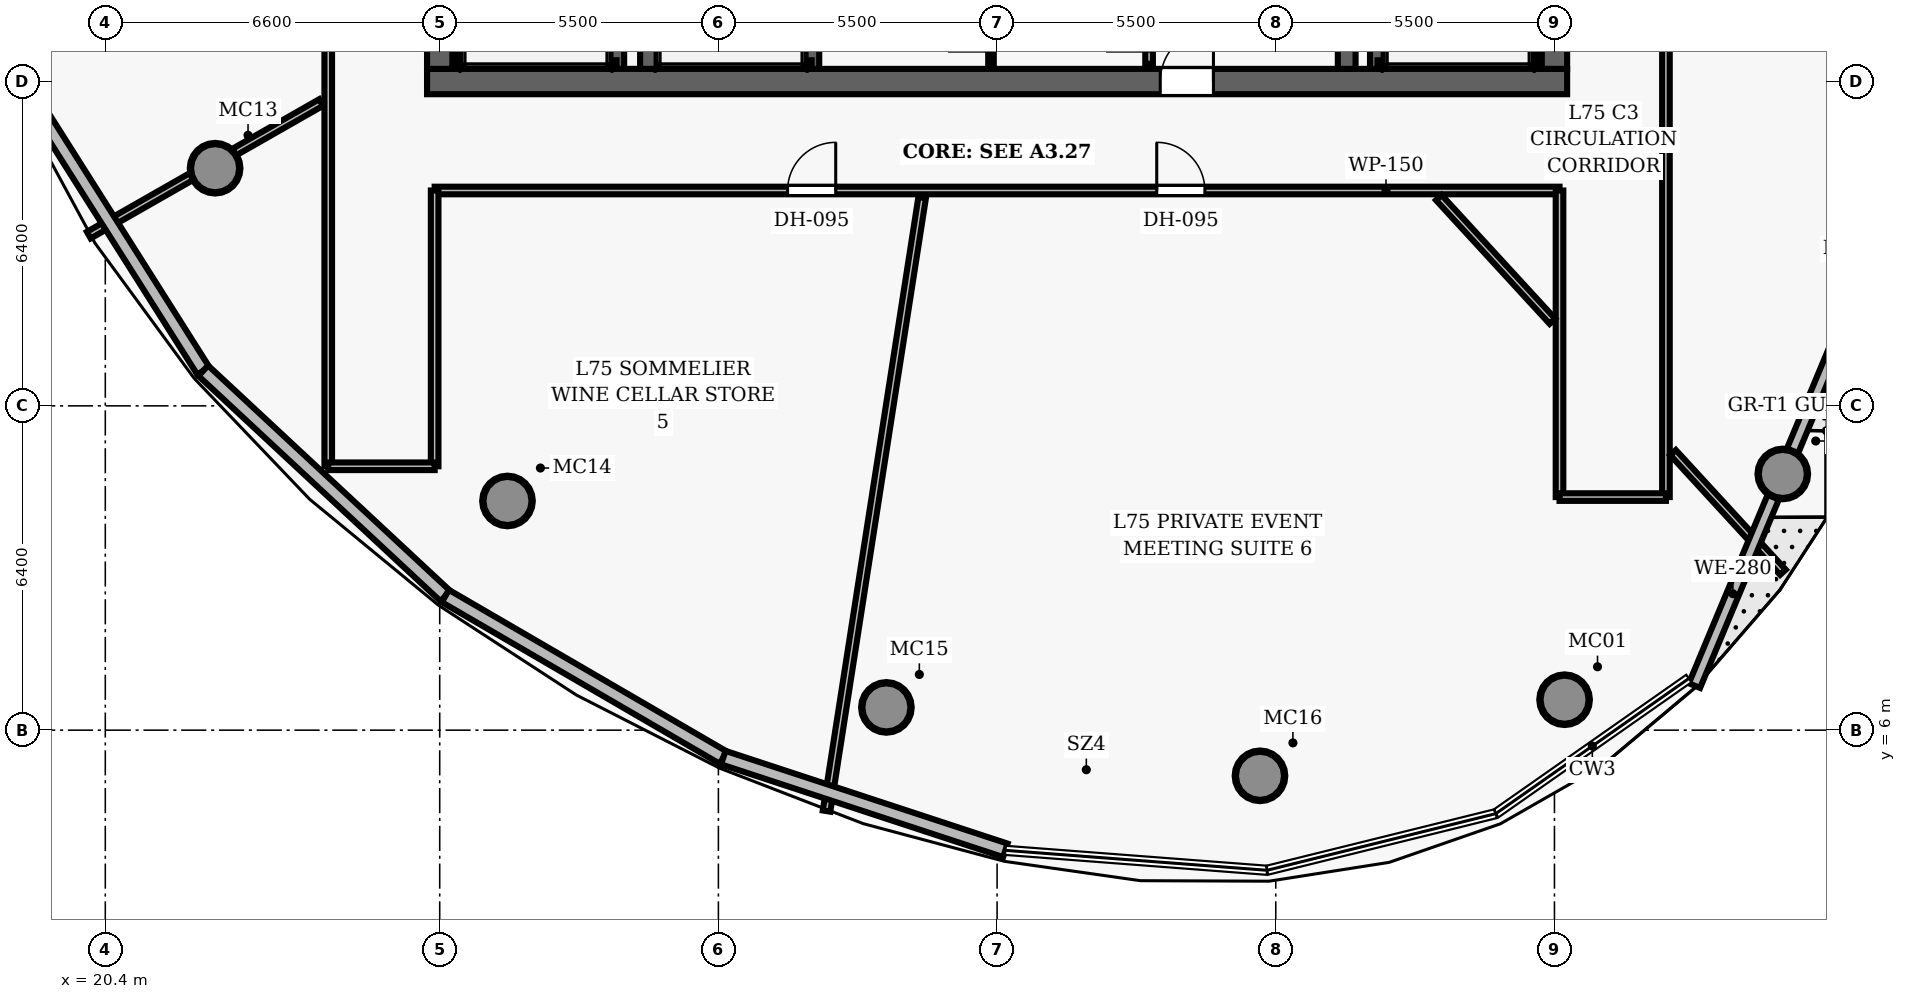
"""IFC4 building model, lengths in metres.
Left out: names, types, materials, properties, quantities, classifications, styles, units other than length and angle.
Written with IfcOpenShell. Run it as: python <this file> out.ifc"""

import sys

from ifc_helpers import new_model, si_unit, direction, frame, frame_2d, origin, origin_2d, place, context, subcontext, project, spatial, rectangle, hollow_circle, extrude, element, fill, save


model = new_model("IFC4")
c1 = context("Model", 3, precision=1e-05, world=origin(), true_north=direction((0.0, 1.0)))
c2 = subcontext(c1, "Body", "Model", "MODEL_VIEW")
j1 = project(units=[si_unit("LENGTHUNIT", "METRE"), si_unit("PLANEANGLEUNIT", "RADIAN")], contexts=[c1])
p1 = place(None, origin())
s1 = spatial("IfcSite", under=j1, at=p1, CompositionType="ELEMENT")
p2 = place(p1, origin())
s2 = spatial("IfcBuilding", under=s1, at=p2, CompositionType="ELEMENT")
p3 = place(p2, frame((0.0, 0.0, 295.95)))
s3 = spatial("IfcBuildingStorey", under=s2, at=p3, CompositionType="ELEMENT", Elevation=295.95)
p4 = place(p3, frame((26.75, 18.8, 0.0), z_axis=(0.0, 0.0, 1.0), x_axis=(1.0, 0.0, 0.0)))
e1 = element("IfcWall", 1, at=p4, inside=s3, PredefinedType="SHEAR", context=c2, shape_type="SweptSolid", body=[
    extrude(rectangle(XDim=22.5, YDim=0.5, at=frame_2d((11.25, 0.0))), origin(), (0.0, 0.0, 1.0), 3.85),
])
p5 = place(p4, frame((14.47, 0.0, 0.0)))
e2 = element("IfcOpeningElement", 2, at=p5, cuts=e1, PredefinedType="OPENING", context=c2, shape_type="SweptSolid", body=[
    extrude(rectangle(XDim=1.05, YDim=2.15, at=frame_2d((0.525, 1.075))), frame((0.0, 0.26, 0.0), z_axis=(0.0, -1.0, 0.0), x_axis=(1.0, 0.0, 0.0)), (0.0, 0.0, 1.0), 0.52),
])
p6 = place(p3, frame((27.0, 19.05, 0.0), z_axis=(0.0, 0.0, 1.0), x_axis=(0.0, 1.0, 0.0)))
e3 = element("IfcWall", 3, at=p6, inside=s3, PredefinedType="SHEAR", context=c2, shape_type="SweptSolid", body=[
    extrude(rectangle(XDim=13.9, YDim=0.5, at=frame_2d((6.95, 0.0))), origin(), (0.0, 0.0, 1.0), 3.85),
])
p7 = place(p6, frame((8.2, 0.0, 0.0)))
e4 = element("IfcOpeningElement", 4, at=p7, cuts=e3, PredefinedType="OPENING", context=c2, shape_type="SweptSolid", body=[
    extrude(rectangle(XDim=1.05, YDim=2.15, at=frame_2d((0.525, 1.075))), frame((0.0, 0.26, 0.0), z_axis=(0.0, -1.0, 0.0), x_axis=(1.0, 0.0, 0.0)), (0.0, 0.0, 1.0), 0.52),
])
p8 = place(p3, frame((49.0, 19.05, 0.0), z_axis=(0.0, 0.0, 1.0), x_axis=(0.0, 1.0, 0.0)))
e5 = element("IfcWall", 5, at=p8, inside=s3, PredefinedType="SHEAR", context=c2, shape_type="SweptSolid", body=[
    extrude(rectangle(XDim=13.9, YDim=0.5, at=frame_2d((6.95, 0.0))), origin(), (0.0, 0.0, 1.0), 3.85),
])
p9 = place(p8, frame((8.2, 0.0, 0.0)))
e6 = element("IfcOpeningElement", 6, at=p9, cuts=e5, PredefinedType="OPENING", context=c2, shape_type="SweptSolid", body=[
    extrude(rectangle(XDim=1.05, YDim=2.15, at=frame_2d((0.525, 1.075))), frame((0.0, 0.26, 0.0), z_axis=(0.0, -1.0, 0.0), x_axis=(1.0, 0.0, 0.0)), (0.0, 0.0, 1.0), 0.52),
])
for number, where, z_axis, x_axis in (
    (7, (31.13, 19.05, 0.0), (0.0, 0.0, 1.0), (0.0, 1.0, 0.0)),
    (8, (44.9, 19.05, 0.0), (0.0, 0.0, 1.0), (0.0, 1.0, 0.0)),
):
    element("IfcWall", number, at=place(p3, frame(where, z_axis=z_axis, x_axis=x_axis)), inside=s3, PredefinedType="SHEAR", context=c2, shape_type="SweptSolid", body=[
        extrude(rectangle(XDim=13.9, YDim=0.35, at=frame_2d((6.95, 0.0))), origin(), (0.0, 0.0, 1.0), 3.85),
    ])
for number, where, z_axis, x_axis in (
    (9, (49.2, 6.601, 0.0), (0.0, 0.0, 1.0), (1.0, 0.0, 0.0)),
    (10, (53.506, 11.056, 0.0), (0.0, 0.0, 1.0), (1.0, 0.0, 0.0)),
    (11, (22.567, 17.09, 0.0), (0.0, 0.0, 1.0), (1.0, 0.0, 0.0)),
    (12, (28.338, 10.523, 0.0), (0.0, 0.0, 1.0), (1.0, 0.0, 0.0)),
    (13, (35.815, 6.449, 0.0), (0.0, 0.0, 1.0), (1.0, 0.0, 0.0)),
    (14, (43.188, 5.099, 0.0), (0.0, 0.0, 1.0), (1.0, 0.0, 0.0)),
):
    element("IfcColumn", number, at=place(p3, frame(where, z_axis=z_axis, x_axis=x_axis)), inside=s3, PredefinedType="COLUMN", context=c2, shape_type="SweptSolid", body=[
        extrude(hollow_circle(Radius=0.5, WallThickness=0.045, at=origin_2d()), origin(), (0.0, 0.0, 1.0), 3.85),
    ])
p10 = place(p3, frame((30.49, 19.05, 0.0), z_axis=(0.0, 0.0, 1.0), x_axis=(0.0, 1.0, 0.0)))
e15 = element("IfcWall", 15, at=p10, inside=s3, PredefinedType="SHEAR", context=c2, shape_type="SweptSolid", body=[
    extrude(rectangle(XDim=7.5, YDim=0.3, at=frame_2d((3.75, 0.0))), origin(), (0.0, 0.0, 1.0), 3.85),
])
p11 = place(p3, frame((27.395, 19.1, 0.0), z_axis=(0.0, 0.0, 1.0), x_axis=(0.0, 1.0, 0.0)))
e16 = element("IfcWall", 16, at=p11, inside=s3, PredefinedType="SHEAR", context=c2, shape_type="SweptSolid", body=[
    extrude(rectangle(XDim=7.45, YDim=0.12, at=frame_2d((3.725, 0.0))), origin(), (0.0, 0.0, 1.0), 3.85),
])
p12 = place(p3, frame((27.395, 19.16, 0.0), z_axis=(0.0, 0.0, 1.0), x_axis=(1.0, 0.0, 0.0)))
e17 = element("IfcWall", 17, at=p12, inside=s3, PredefinedType="SHEAR", context=c2, shape_type="SweptSolid", body=[
    extrude(rectangle(XDim=3.095, YDim=0.12, at=frame_2d((1.547, 0.0))), origin(), (0.0, 0.0, 1.0), 3.85),
])
p13 = place(p3, frame((45.51, 19.05, 0.0), z_axis=(0.0, 0.0, 1.0), x_axis=(0.0, 1.0, 0.0)))
e18 = element("IfcWall", 18, at=p13, inside=s3, PredefinedType="SHEAR", context=c2, shape_type="SweptSolid", body=[
    extrude(rectangle(XDim=7.5, YDim=0.3, at=frame_2d((3.75, 0.0))), origin(), (0.0, 0.0, 1.0), 3.85),
])
p14 = place(p3, frame((48.605, 19.1, 0.0), z_axis=(0.0, 0.0, 1.0), x_axis=(0.0, 1.0, 0.0)))
e19 = element("IfcWall", 19, at=p14, inside=s3, PredefinedType="SHEAR", context=c2, shape_type="SweptSolid", body=[
    extrude(rectangle(XDim=7.45, YDim=0.12, at=frame_2d((3.725, 0.0))), origin(), (0.0, 0.0, 1.0), 3.85),
])
p15 = place(p3, frame((45.51, 19.16, 0.0), z_axis=(0.0, 0.0, 1.0), x_axis=(1.0, 0.0, 0.0)))
e20 = element("IfcWall", 20, at=p15, inside=s3, PredefinedType="SHEAR", context=c2, shape_type="SweptSolid", body=[
    extrude(rectangle(XDim=3.095, YDim=0.12, at=frame_2d((1.547, 0.0))), origin(), (0.0, 0.0, 1.0), 3.85),
])
p16 = place(p3, frame((34.34, 19.05, 0.0), z_axis=(0.0, 0.0, 1.0), x_axis=(0.0, 1.0, 0.0)))
e21 = element("IfcWall", 21, at=p16, inside=s3, PredefinedType="SHEAR", context=c2, shape_type="SweptSolid", body=[
    extrude(rectangle(XDim=7.5, YDim=0.3, at=frame_2d((3.75, 0.0))), origin(), (0.0, 0.0, 1.0), 3.85),
])
p17 = place(p3, frame((31.3, 19.16, 0.0), z_axis=(0.0, 0.0, 1.0), x_axis=(1.0, 0.0, 0.0)))
e22 = element("IfcWall", 22, at=p17, inside=s3, PredefinedType="SHEAR", context=c2, shape_type="SweptSolid", body=[
    extrude(rectangle(XDim=3.04, YDim=0.12, at=frame_2d((1.52, 0.0))), origin(), (0.0, 0.0, 1.0), 3.85),
])
p18 = place(p3, frame((41.0, 19.15, 0.0), z_axis=(0.0, 0.0, 1.0), x_axis=(0.0, 1.0, 0.0)))
e23 = element("IfcWall", 23, at=p18, inside=s3, PredefinedType="PARTITIONING", context=c2, shape_type="SweptSolid", body=[
    extrude(rectangle(XDim=7.95, YDim=0.15, at=frame_2d((3.975, 0.0))), origin(), (0.0, 0.0, 1.0), 3.04),
])
p19 = place(p18, frame((0.25, 0.0, 0.0)))
e24 = element("IfcOpeningElement", 24, at=p19, cuts=e23, PredefinedType="OPENING", context=c2, shape_type="SweptSolid", body=[
    extrude(rectangle(XDim=0.85, YDim=2.1, at=frame_2d((0.425, 1.05))), frame((0.0, 0.085, 0.0), z_axis=(0.0, -1.0, 0.0), x_axis=(1.0, 0.0, 0.0)), (0.0, 0.0, 1.0), 0.17),
])
p20 = place(p18, frame((2.953, 0.0, 0.0)))
e25 = element("IfcOpeningElement", 25, at=p20, cuts=e23, PredefinedType="OPENING", context=c2, shape_type="SweptSolid", body=[
    extrude(rectangle(XDim=0.85, YDim=2.1, at=frame_2d((0.425, 1.05))), frame((0.0, 0.085, 0.0), z_axis=(0.0, -1.0, 0.0), x_axis=(1.0, 0.0, 0.0)), (0.0, 0.0, 1.0), 0.17),
])
p21 = place(p18, frame((5.576, 0.0, 0.0)))
e26 = element("IfcOpeningElement", 26, at=p21, cuts=e23, PredefinedType="OPENING", context=c2, shape_type="SweptSolid", body=[
    extrude(rectangle(XDim=0.85, YDim=2.1, at=frame_2d((0.425, 1.05))), frame((0.0, 0.085, 0.0), z_axis=(0.0, -1.0, 0.0), x_axis=(1.0, 0.0, 0.0)), (0.0, 0.0, 1.0), 0.17),
])
p22 = place(p3, frame((37.88, 19.15, 0.0), z_axis=(0.0, 0.0, 1.0), x_axis=(0.0, 1.0, 0.0)))
e27 = element("IfcWall", 27, at=p22, inside=s3, PredefinedType="PARTITIONING", context=c2, shape_type="SweptSolid", body=[
    extrude(rectangle(XDim=7.95, YDim=0.11, at=frame_2d((3.975, 0.0))), origin(), (0.0, 0.0, 1.0), 3.04),
])
p23 = place(p22, frame((0.25, 0.0, 0.0)))
e28 = element("IfcOpeningElement", 28, at=p23, cuts=e27, PredefinedType="OPENING", context=c2, shape_type="SweptSolid", body=[
    extrude(rectangle(XDim=0.85, YDim=2.1, at=frame_2d((0.425, 1.05))), frame((0.0, 0.065, 0.0), z_axis=(0.0, -1.0, 0.0), x_axis=(1.0, 0.0, 0.0)), (0.0, 0.0, 1.0), 0.13),
])
p24 = place(p22, frame((2.953, 0.0, 0.0)))
e29 = element("IfcOpeningElement", 29, at=p24, cuts=e27, PredefinedType="OPENING", context=c2, shape_type="SweptSolid", body=[
    extrude(rectangle(XDim=0.85, YDim=2.1, at=frame_2d((0.425, 1.05))), frame((0.0, 0.065, 0.0), z_axis=(0.0, -1.0, 0.0), x_axis=(1.0, 0.0, 0.0)), (0.0, 0.0, 1.0), 0.13),
])
p25 = place(p22, frame((5.576, 0.0, 0.0)))
e30 = element("IfcOpeningElement", 30, at=p25, cuts=e27, PredefinedType="OPENING", context=c2, shape_type="SweptSolid", body=[
    extrude(rectangle(XDim=0.85, YDim=2.1, at=frame_2d((0.425, 1.05))), frame((0.0, 0.065, 0.0), z_axis=(0.0, -1.0, 0.0), x_axis=(1.0, 0.0, 0.0)), (0.0, 0.0, 1.0), 0.13),
])
p26 = place(p3, frame((26.9, 16.65, 0.0), z_axis=(0.0, 0.0, 1.0), x_axis=(1.0, 0.0, 0.0)))
e31 = element("IfcWall", 31, at=p26, inside=s3, PredefinedType="PARTITIONING", context=c2, shape_type="SweptSolid", body=[
    extrude(rectangle(XDim=22.2, YDim=0.15, at=frame_2d((11.1, 0.0))), origin(), (0.0, 0.0, 1.0), 3.04),
])
p27 = place(p26, frame((6.965, 0.0, 0.0)))
e32 = element("IfcOpeningElement", 32, at=p27, cuts=e31, PredefinedType="OPENING", context=c2, shape_type="SweptSolid", body=[
    extrude(rectangle(XDim=0.95, YDim=2.15, at=frame_2d((0.475, 1.075))), frame((0.0, 0.085, 0.0), z_axis=(0.0, -1.0, 0.0), x_axis=(1.0, 0.0, 0.0)), (0.0, 0.0, 1.0), 0.17),
])
p28 = place(p26, frame((14.251, 0.0, 0.0)))
e33 = element("IfcOpeningElement", 33, at=p28, cuts=e31, PredefinedType="OPENING", context=c2, shape_type="SweptSolid", body=[
    extrude(rectangle(XDim=0.95, YDim=2.15, at=frame_2d((0.475, 1.075))), frame((0.0, 0.085, 0.0), z_axis=(0.0, -1.0, 0.0), x_axis=(1.0, 0.0, 0.0)), (0.0, 0.0, 1.0), 0.17),
])
p29 = place(p3, frame((24.8, 11.208, 0.0), z_axis=(0.0, 0.0, 1.0), x_axis=(0.0, 1.0, 0.0)))
e34 = element("IfcWall", 34, at=p29, inside=s3, PredefinedType="PARTITIONING", context=c2, shape_type="SweptSolid", body=[
    extrude(rectangle(XDim=30.192, YDim=0.15, at=frame_2d((15.096, 0.0))), origin(), (0.0, 0.0, 1.0), 3.04),
])
p30 = place(p29, frame((16.542, 0.0, 0.0)))
e35 = element("IfcOpeningElement", 35, at=p30, cuts=e34, PredefinedType="OPENING", context=c2, shape_type="SweptSolid", body=[
    extrude(rectangle(XDim=0.95, YDim=2.15, at=frame_2d((0.475, 1.075))), frame((0.0, 0.085, 0.0), z_axis=(0.0, -1.0, 0.0), x_axis=(1.0, 0.0, 0.0)), (0.0, 0.0, 1.0), 0.17),
])
p31 = place(p3, frame((26.9, 11.208, 0.0), z_axis=(0.0, 0.0, 1.0), x_axis=(0.0, 1.0, 0.0)))
e36 = element("IfcWall", 36, at=p31, inside=s3, PredefinedType="PARTITIONING", context=c2, shape_type="SweptSolid", body=[
    extrude(rectangle(XDim=5.442, YDim=0.15, at=frame_2d((2.721, 0.0))), origin(), (0.0, 0.0, 1.0), 3.04),
])
p32 = place(p3, frame((24.8, 11.208, 0.0), z_axis=(0.0, 0.0, 1.0), x_axis=(1.0, 0.0, 0.0)))
e37 = element("IfcWall", 37, at=p32, inside=s3, PredefinedType="PARTITIONING", context=c2, shape_type="SweptSolid", body=[
    extrude(rectangle(XDim=2.1, YDim=0.15, at=frame_2d((1.05, 0.0))), origin(), (0.0, 0.0, 1.0), 3.04),
])
p33 = place(p3, frame((51.2, 10.6, 0.0), z_axis=(0.0, 0.0, 1.0), x_axis=(0.0, 1.0, 0.0)))
e38 = element("IfcWall", 38, at=p33, inside=s3, PredefinedType="PARTITIONING", context=c2, shape_type="SweptSolid", body=[
    extrude(rectangle(XDim=30.8, YDim=0.15, at=frame_2d((15.4, 0.0))), origin(), (0.0, 0.0, 1.0), 3.04),
])
p34 = place(p33, frame((18.976, 0.0, 0.0)))
e39 = element("IfcOpeningElement", 39, at=p34, cuts=e38, PredefinedType="OPENING", context=c2, shape_type="SweptSolid", body=[
    extrude(rectangle(XDim=1.5, YDim=2.2, at=frame_2d((0.75, 1.1))), frame((0.0, 0.085, 0.0), z_axis=(0.0, -1.0, 0.0), x_axis=(1.0, 0.0, 0.0)), (0.0, 0.0, 1.0), 0.17),
])
p35 = place(p33, frame((12.135, 0.0, 0.0)))
e40 = element("IfcOpeningElement", 40, at=p35, cuts=e38, PredefinedType="OPENING", context=c2, shape_type="SweptSolid", body=[
    extrude(rectangle(XDim=0.95, YDim=2.15, at=frame_2d((0.475, 1.075))), frame((0.0, 0.085, 0.0), z_axis=(0.0, -1.0, 0.0), x_axis=(1.0, 0.0, 0.0)), (0.0, 0.0, 1.0), 0.17),
])
p36 = place(p3, frame((49.1, 10.6, 0.0), z_axis=(0.0, 0.0, 1.0), x_axis=(0.0, 1.0, 0.0)))
e41 = element("IfcWall", 41, at=p36, inside=s3, PredefinedType="PARTITIONING", context=c2, shape_type="SweptSolid", body=[
    extrude(rectangle(XDim=6.05, YDim=0.15, at=frame_2d((3.025, 0.0))), origin(), (0.0, 0.0, 1.0), 3.04),
])
p37 = place(p3, frame((49.1, 10.6, 0.0), z_axis=(0.0, 0.0, 1.0), x_axis=(1.0, 0.0, 0.0)))
e42 = element("IfcWall", 42, at=p37, inside=s3, PredefinedType="PARTITIONING", context=c2, shape_type="SweptSolid", body=[
    extrude(rectangle(XDim=2.1, YDim=0.15, at=frame_2d((1.05, 0.0))), origin(), (0.0, 0.0, 1.0), 3.04),
])
p38 = place(p3, frame((24.66, 18.387, 0.0), z_axis=(0.0, 0.0, 1.0), x_axis=(-0.868484898305, -0.495715625551, 0.0)))
e43 = element("IfcWall", 43, at=p38, inside=s3, PredefinedType="PARTITIONING", context=c2, shape_type="SweptSolid", body=[
    extrude(rectangle(XDim=5.28, YDim=0.15, at=frame_2d((2.64, 0.0))), origin(), (0.0, 0.0, 1.0), 3.04),
])
p39 = place(p3, frame((36.521, 16.51, 0.0), z_axis=(0.0, 0.0, 1.0), x_axis=(-0.153979358171, -0.988074064662, 0.0)))
e44 = element("IfcWall", 44, at=p39, inside=s3, PredefinedType="PARTITIONING", context=c2, shape_type="SweptSolid", body=[
    extrude(rectangle(XDim=12.253, YDim=0.15, at=frame_2d((6.126, 0.0))), origin(), (0.0, 0.0, 1.0), 3.04),
])
p40 = place(p3, frame((46.718, 16.51, 0.0), z_axis=(0.0, 0.0, 1.0), x_axis=(0.676491436153, -0.736450498548, 0.0)))
e45 = element("IfcWall", 45, at=p40, inside=s3, PredefinedType="PARTITIONING", context=c2, shape_type="SweptSolid", body=[
    extrude(rectangle(XDim=3.314, YDim=0.15, at=frame_2d((1.657, 0.0))), origin(), (0.0, 0.0, 1.0), 3.04),
])
p41 = place(p3, frame((51.34, 11.478, 0.0), z_axis=(0.0, 0.0, 1.0), x_axis=(0.676513721028, -0.736430027403, 0.0)))
e46 = element("IfcWall", 46, at=p41, inside=s3, PredefinedType="PARTITIONING", context=c2, shape_type="SweptSolid", body=[
    extrude(rectangle(XDim=3.207, YDim=0.15, at=frame_2d((1.604, 0.0))), origin(), (0.0, 0.0, 1.0), 3.04),
])
p42 = place(p3, frame((56.045, 17.126, 0.0), z_axis=(0.0, 0.0, 1.0), x_axis=(-0.385512828822, -0.922702475782, 0.0)))
e47 = element("IfcWall", 47, at=p42, inside=s3, PredefinedType="SOLIDWALL", context=c2, shape_type="SweptSolid", body=[
    extrude(rectangle(XDim=11.105, YDim=0.24, at=frame_2d((5.552, 0.0))), origin(), (0.0, 0.0, 1.0), 2.8),
])
p43 = place(p42, frame((2.601, 0.0, 0.0)))
e48 = element("IfcOpeningElement", 48, at=p43, cuts=e47, PredefinedType="OPENING", context=c2, shape_type="SweptSolid", body=[
    extrude(rectangle(XDim=1.1, YDim=2.2, at=frame_2d((0.55, 1.1))), frame((0.0, 0.13, 0.0), z_axis=(0.0, -1.0, 0.0), x_axis=(1.0, 0.0, 0.0)), (0.0, 0.0, 1.0), 0.26),
])
p44 = place(p3, frame((22.334, 13.093, 0.0), z_axis=(0.0, 0.0, 1.0), x_axis=(-0.53478508488, 0.844988114111, 0.0)))
e49 = element("IfcWall", 49, at=p44, inside=s3, PredefinedType="SOLIDWALL", context=c2, shape_type="SweptSolid", body=[
    extrude(rectangle(XDim=6.527, YDim=0.28, at=frame_2d((3.263, 0.0))), origin(), (0.0, 0.0, 1.0), 3.625),
])
p45 = place(p3, frame((27.111, 8.647, 0.0), z_axis=(0.0, 0.0, 1.0), x_axis=(-0.732050928605, 0.681249908571, 0.0)))
e50 = element("IfcWall", 50, at=p45, inside=s3, PredefinedType="SOLIDWALL", context=c2, shape_type="SweptSolid", body=[
    extrude(rectangle(XDim=6.526, YDim=0.28, at=frame_2d((3.263, 0.0))), origin(), (0.0, 0.0, 1.0), 3.625),
])
p46 = place(p3, frame((32.597, 5.458, 0.0), z_axis=(0.0, 0.0, 1.0), x_axis=(-0.864530125535, 0.502581000478, 0.0)))
e51 = element("IfcWall", 51, at=p46, inside=s3, PredefinedType="SOLIDWALL", context=c2, shape_type="SweptSolid", body=[
    extrude(rectangle(XDim=6.345, YDim=0.28, at=frame_2d((3.173, 0.0))), origin(), (0.0, 0.0, 1.0), 3.625),
])
p47 = place(p3, frame((38.164, 3.628, 0.0), z_axis=(0.0, 0.0, 1.0), x_axis=(-0.950008094352, 0.312225272304, 0.0)))
e52 = element("IfcWall", 52, at=p47, inside=s3, PredefinedType="SOLIDWALL", context=c2, shape_type="SweptSolid", body=[
    extrude(rectangle(XDim=5.86, YDim=0.28, at=frame_2d((2.93, 0.0))), origin(), (0.0, 0.0, 1.0), 3.625),
])
p48 = place(p5, origin())
e53 = element("IfcDoor", 53, at=p48, inside=s3, OperationType="SINGLE_SWING_RIGHT", PredefinedType="DOOR", context=c2, shape_type="SweptSolid", body=[
    extrude(rectangle(XDim=1.05, YDim=2.15, at=frame_2d((0.525, 1.075))), frame((0.0, 0.025, 0.0), z_axis=(0.0, -1.0, 0.0), x_axis=(1.0, 0.0, 0.0)), (0.0, 0.0, 1.0), 0.05),
])
fill(e2, e53)
p49 = place(p27, origin())
e54 = element("IfcDoor", 54, at=p49, inside=s3, OperationType="SINGLE_SWING_RIGHT", PredefinedType="DOOR", context=c2, shape_type="SweptSolid", body=[
    extrude(rectangle(XDim=0.95, YDim=2.15, at=frame_2d((0.475, 1.075))), frame((0.0, 0.025, 0.0), z_axis=(0.0, -1.0, 0.0), x_axis=(1.0, 0.0, 0.0)), (0.0, 0.0, 1.0), 0.05),
])
fill(e32, e54)
p50 = place(p28, origin())
e55 = element("IfcDoor", 55, at=p50, inside=s3, OperationType="SINGLE_SWING_LEFT", PredefinedType="DOOR", context=c2, shape_type="SweptSolid", body=[
    extrude(rectangle(XDim=0.95, YDim=2.15, at=frame_2d((0.475, 1.075))), frame((0.0, 0.025, 0.0), z_axis=(0.0, -1.0, 0.0), x_axis=(1.0, 0.0, 0.0)), (0.0, 0.0, 1.0), 0.05),
])
fill(e33, e55)
save(model, sys.argv[1])
